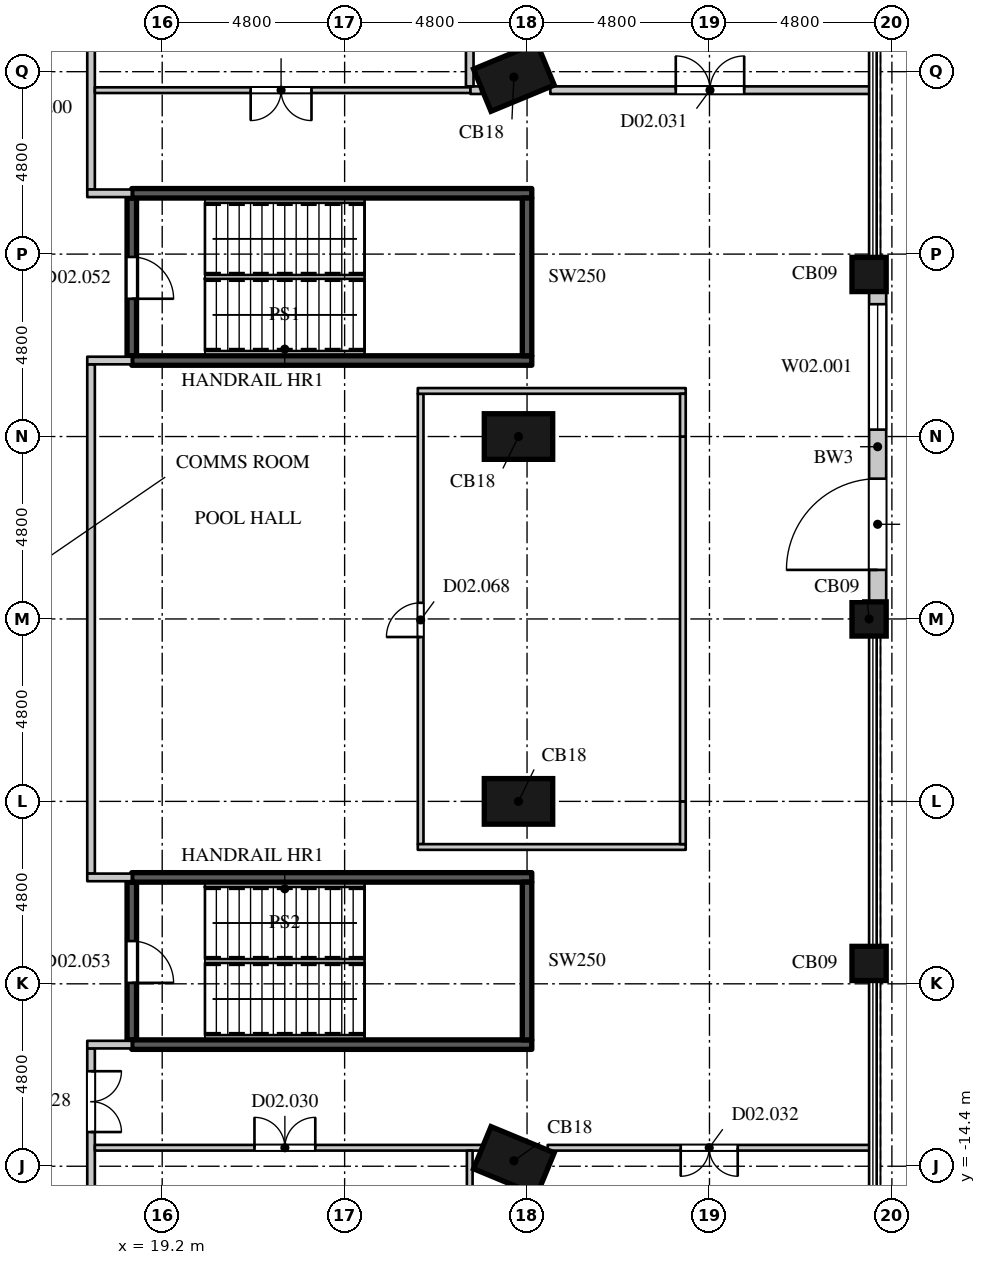
"""IFC4 building model, lengths in metres.
Left out: names, types, materials, properties, quantities, classifications, styles, units other than length and angle.
Written with IfcOpenShell. Run it as: python <this file> out.ifc"""

import sys

from ifc_helpers import new_model, si_unit, direction, frame, frame_2d, origin, origin_2d, place, context, subcontext, project, spatial, rectangle, extrude, element, fill, save


model = new_model("IFC4")
c1 = context("Model", 3, precision=1e-05, world=origin(), true_north=direction((0.0, 1.0)))
c2 = subcontext(c1, "Body", "Model", "MODEL_VIEW")
j1 = project(units=[si_unit("LENGTHUNIT", "METRE"), si_unit("PLANEANGLEUNIT", "RADIAN")], contexts=[c1])
p1 = place(None, origin())
s1 = spatial("IfcSite", under=j1, at=p1, CompositionType="ELEMENT")
p2 = place(p1, origin())
s2 = spatial("IfcBuilding", under=s1, at=p2, CompositionType="ELEMENT")
p3 = place(p2, frame((0.0, 0.0, 11.0)))
s3 = spatial("IfcBuildingStorey", under=s2, at=p3, CompositionType="ELEMENT", Elevation=11.0)
p4 = place(p3, frame((28.454, -14.257, 0.0), z_axis=(0.0, 0.0, 1.0), x_axis=(0.382683496864, 0.923879505795, 0.0)))
e1 = element("IfcColumn", 1, at=p4, inside=s3, PredefinedType="COLUMN", context=c2, shape_type="SweptSolid", body=[
    extrude(rectangle(XDim=1.2, YDim=1.8, at=origin_2d()), origin(), (0.0, 0.0, 1.0), 5.0),
])
p5 = place(p3, frame((37.8, -9.064, 0.0), z_axis=(0.0, 0.0, 1.0), x_axis=(1.0, 0.0, 0.0)))
e2 = element("IfcColumn", 2, at=p5, inside=s3, PredefinedType="COLUMN", context=c2, shape_type="SweptSolid", body=[
    extrude(rectangle(XDim=0.9, YDim=0.9, at=origin_2d()), origin(), (0.0, 0.0, 1.0), 5.0),
])
p6 = place(p3, frame((28.575, -4.8, 0.0), z_axis=(0.0, 0.0, 1.0), x_axis=(0.0, 1.0, 0.0)))
e3 = element("IfcColumn", 3, at=p6, inside=s3, PredefinedType="COLUMN", context=c2, shape_type="SweptSolid", body=[
    extrude(rectangle(XDim=1.2, YDim=1.8, at=origin_2d()), origin(), (0.0, 0.0, 1.0), 5.0),
])
p7 = place(p3, frame((37.8, 0.0, 0.0), z_axis=(0.0, 0.0, 1.0), x_axis=(1.0, 0.0, 0.0)))
e4 = element("IfcColumn", 4, at=p7, inside=s3, PredefinedType="COLUMN", context=c2, shape_type="SweptSolid", body=[
    extrude(rectangle(XDim=0.9, YDim=0.9, at=origin_2d()), origin(), (0.0, 0.0, 1.0), 5.0),
])
p8 = place(p3, frame((28.575, 4.8, 0.0), z_axis=(0.0, 0.0, 1.0), x_axis=(0.0, 1.0, 0.0)))
e5 = element("IfcColumn", 5, at=p8, inside=s3, PredefinedType="COLUMN", context=c2, shape_type="SweptSolid", body=[
    extrude(rectangle(XDim=1.2, YDim=1.8, at=origin_2d()), origin(), (0.0, 0.0, 1.0), 5.0),
])
p9 = place(p3, frame((37.8, 9.064, 0.0), z_axis=(0.0, 0.0, 1.0), x_axis=(1.0, 0.0, 0.0)))
e6 = element("IfcColumn", 6, at=p9, inside=s3, PredefinedType="COLUMN", context=c2, shape_type="SweptSolid", body=[
    extrude(rectangle(XDim=0.9, YDim=0.9, at=origin_2d()), origin(), (0.0, 0.0, 1.0), 5.0),
])
p10 = place(p3, frame((28.454, 14.257, 0.0), z_axis=(0.0, 0.0, 1.0), x_axis=(-0.382683496864, 0.923879505795, 0.0)))
e7 = element("IfcColumn", 7, at=p10, inside=s3, PredefinedType="COLUMN", context=c2, shape_type="SweptSolid", body=[
    extrude(rectangle(XDim=1.2, YDim=1.8, at=origin_2d()), origin(), (0.0, 0.0, 1.0), 5.0),
])
p11 = place(p3, frame((38.025, 0.45, 0.0), z_axis=(0.0, 0.0, 1.0), x_axis=(0.0, 1.0, 0.0)))
e8 = element("IfcWall", 8, at=p11, inside=s3, PredefinedType="ELEMENTEDWALL", context=c2, shape_type="SweptSolid", body=[
    extrude(rectangle(XDim=8.164, YDim=0.45, at=frame_2d((4.082, 0.0))), origin(), (0.0, 0.0, 1.0), 3.8),
])
p12 = place(p11, frame((0.841, 0.0, 0.0)))
e9 = element("IfcOpeningElement", 9, at=p12, cuts=e8, PredefinedType="OPENING", context=c2, shape_type="SweptSolid", body=[
    extrude(rectangle(XDim=2.4, YDim=2.7, at=frame_2d((1.2, 1.35))), frame((0.0, 0.235, 0.0), z_axis=(0.0, -1.0, 0.0), x_axis=(1.0, 0.0, 0.0)), (0.0, 0.0, 1.0), 0.47),
])
p13 = place(p11, frame((4.532, 0.0, 1.05)))
e10 = element("IfcOpeningElement", 10, at=p13, cuts=e8, PredefinedType="OPENING", context=c2, shape_type="SweptSolid", body=[
    extrude(rectangle(XDim=3.3, YDim=2.7, at=frame_2d((1.65, 1.35))), frame((0.0, 0.235, 0.0), z_axis=(0.0, -1.0, 0.0), x_axis=(1.0, 0.0, 0.0)), (0.0, 0.0, 1.0), 0.47),
])
p14 = place(p3, frame((17.328, -15.6, 0.0), z_axis=(0.0, 0.0, 1.0), x_axis=(0.0, 1.0, 0.0)))
e11 = element("IfcWall", 11, at=p14, inside=s3, PredefinedType="PARTITIONING", context=c2, shape_type="SweptSolid", body=[
    extrude(rectangle(XDim=4.3, YDim=0.2, at=frame_2d((2.15, 0.0))), origin(), (0.0, 0.0, 1.0), 4.65),
])
p15 = place(p14, frame((2.1, 0.0, 0.0)))
e12 = element("IfcOpeningElement", 12, at=p15, cuts=e11, PredefinedType="OPENING", context=c2, shape_type="SweptSolid", body=[
    extrude(rectangle(XDim=1.6, YDim=2.4, at=frame_2d((0.8, 1.2))), frame((0.0, 0.11, 0.0), z_axis=(0.0, -1.0, 0.0), x_axis=(1.0, 0.0, 0.0)), (0.0, 0.0, 1.0), 0.22),
])
p16 = place(p3, frame((17.228, -11.2, 0.0), z_axis=(0.0, 0.0, 1.0), x_axis=(1.0, 0.0, 0.0)))
e13 = element("IfcWall", 13, at=p16, inside=s3, PredefinedType="PARTITIONING", context=c2, shape_type="SweptSolid", body=[
    extrude(rectangle(XDim=1.172, YDim=0.2, at=frame_2d((0.586, 0.0))), origin(), (0.0, 0.0, 1.0), 4.65),
])
p17 = place(p3, frame((17.328, -6.7, 0.0), z_axis=(0.0, 0.0, 1.0), x_axis=(0.0, 1.0, 0.0)))
e14 = element("IfcWall", 14, at=p17, inside=s3, PredefinedType="PARTITIONING", context=c2, shape_type="SweptSolid", body=[
    extrude(rectangle(XDim=13.4, YDim=0.2, at=frame_2d((6.7, 0.0))), origin(), (0.0, 0.0, 1.0), 4.65),
])
for number, where, z_axis, x_axis in (
    (15, (17.228, -6.8, 0.0), (0.0, 0.0, 1.0), (1.0, 0.0, 0.0)),
    (16, (17.228, 6.8, 0.0), (0.0, 0.0, 1.0), (1.0, 0.0, 0.0)),
):
    element("IfcWall", number, at=place(p3, frame(where, z_axis=z_axis, x_axis=x_axis)), inside=s3, PredefinedType="PARTITIONING", context=c2, shape_type="SweptSolid", body=[
        extrude(rectangle(XDim=1.172, YDim=0.2, at=frame_2d((0.586, 0.0))), origin(), (0.0, 0.0, 1.0), 4.65),
    ])
p18 = place(p3, frame((17.328, 11.3, 0.0), z_axis=(0.0, 0.0, 1.0), x_axis=(0.0, 1.0, 0.0)))
e17 = element("IfcWall", 17, at=p18, inside=s3, PredefinedType="PARTITIONING", context=c2, shape_type="SweptSolid", body=[
    extrude(rectangle(XDim=4.28, YDim=0.2, at=frame_2d((2.14, 0.0))), origin(), (0.0, 0.0, 1.0), 4.65),
])
p19 = place(p3, frame((17.228, 11.2, 0.0), z_axis=(0.0, 0.0, 1.0), x_axis=(1.0, 0.0, 0.0)))
e18 = element("IfcWall", 18, at=p19, inside=s3, PredefinedType="PARTITIONING", context=c2, shape_type="SweptSolid", body=[
    extrude(rectangle(XDim=1.172, YDim=0.2, at=frame_2d((0.586, 0.0))), origin(), (0.0, 0.0, 1.0), 4.65),
])
p20 = place(p3, frame((17.428, -13.914, 0.0), z_axis=(0.0, 0.0, 1.0), x_axis=(1.0, 0.0, 0.0)))
e19 = element("IfcWall", 19, at=p20, inside=s3, PredefinedType="PARTITIONING", context=c2, shape_type="SweptSolid", body=[
    extrude(rectangle(XDim=10.174, YDim=0.15, at=frame_2d((5.087, 0.0))), origin(), (0.0, 0.0, 1.0), 4.65),
])
p21 = place(p20, frame((4.2, 0.0, 0.0)))
e20 = element("IfcOpeningElement", 20, at=p21, cuts=e19, PredefinedType="OPENING", context=c2, shape_type="SweptSolid", body=[
    extrude(rectangle(XDim=1.6, YDim=2.4, at=frame_2d((0.8, 1.2))), frame((0.0, 0.085, 0.0), z_axis=(0.0, -1.0, 0.0), x_axis=(1.0, 0.0, 0.0)), (0.0, 0.0, 1.0), 0.17),
])
p22 = place(p3, frame((29.343, -13.914, 0.0), z_axis=(0.0, 0.0, 1.0), x_axis=(1.0, 0.0, 0.0)))
e21 = element("IfcWall", 21, at=p22, inside=s3, PredefinedType="PARTITIONING", context=c2, shape_type="SweptSolid", body=[
    extrude(rectangle(XDim=8.512, YDim=0.15, at=frame_2d((4.256, 0.0))), origin(), (0.0, 0.0, 1.0), 4.65),
])
p23 = place(p22, frame((3.5, 0.0, 0.0)))
e22 = element("IfcOpeningElement", 22, at=p23, cuts=e21, PredefinedType="OPENING", context=c2, shape_type="SweptSolid", body=[
    extrude(rectangle(XDim=1.5, YDim=2.2, at=frame_2d((0.75, 1.1))), frame((0.0, 0.085, 0.0), z_axis=(0.0, -1.0, 0.0), x_axis=(1.0, 0.0, 0.0)), (0.0, 0.0, 1.0), 0.17),
])
p24 = place(p3, frame((17.428, 13.914, 0.0), z_axis=(0.0, 0.0, 1.0), x_axis=(1.0, 0.0, 0.0)))
e23 = element("IfcWall", 23, at=p24, inside=s3, PredefinedType="PARTITIONING", context=c2, shape_type="SweptSolid", body=[
    extrude(rectangle(XDim=9.884, YDim=0.15, at=frame_2d((4.942, 0.0))), origin(), (0.0, 0.0, 1.0), 4.65),
])
p25 = place(p24, frame((4.1, 0.0, 0.0)))
e24 = element("IfcOpeningElement", 24, at=p25, cuts=e23, PredefinedType="OPENING", context=c2, shape_type="SweptSolid", body=[
    extrude(rectangle(XDim=1.6, YDim=2.4, at=frame_2d((0.8, 1.2))), frame((0.0, 0.085, 0.0), z_axis=(0.0, -1.0, 0.0), x_axis=(1.0, 0.0, 0.0)), (0.0, 0.0, 1.0), 0.17),
])
p26 = place(p3, frame((26.0, -5.925, 0.0), z_axis=(0.0, 0.0, 1.0), x_axis=(0.0, 1.0, 0.0)))
e25 = element("IfcWall", 25, at=p26, inside=s3, PredefinedType="PARTITIONING", context=c2, shape_type="SweptSolid", body=[
    extrude(rectangle(XDim=11.85, YDim=0.15, at=frame_2d((5.925, 0.0))), origin(), (0.0, 0.0, 1.0), 4.65),
])
p27 = place(p26, frame((5.45, 0.0, 0.0)))
e26 = element("IfcOpeningElement", 26, at=p27, cuts=e25, PredefinedType="OPENING", context=c2, shape_type="SweptSolid", body=[
    extrude(rectangle(XDim=0.9, YDim=2.2, at=frame_2d((0.45, 1.1))), frame((0.0, 0.085, 0.0), z_axis=(0.0, -1.0, 0.0), x_axis=(1.0, 0.0, 0.0)), (0.0, 0.0, 1.0), 0.17),
])
for number, where, z_axis, x_axis in (
    (27, (25.925, -6.0, 0.0), (0.0, 0.0, 1.0), (1.0, 0.0, 0.0)),
    (28, (25.925, 6.0, 0.0), (0.0, 0.0, 1.0), (1.0, 0.0, 0.0)),
):
    element("IfcWall", number, at=place(p3, frame(where, z_axis=z_axis, x_axis=x_axis)), inside=s3, PredefinedType="PARTITIONING", context=c2, shape_type="SweptSolid", body=[
        extrude(rectangle(XDim=7.05, YDim=0.15, at=frame_2d((3.525, 0.0))), origin(), (0.0, 0.0, 1.0), 4.65),
    ])
p28 = place(p3, frame((27.292, -28.714, 0.0), z_axis=(0.0, 0.0, 1.0), x_axis=(0.0, 1.0, 0.0)))
e29 = element("IfcWall", 29, at=p28, inside=s3, PredefinedType="PARTITIONING", context=c2, shape_type="SweptSolid", body=[
    extrude(rectangle(XDim=14.725, YDim=0.15, at=frame_2d((7.363, 0.0))), origin(), (0.0, 0.0, 1.0), 4.65),
])
p29 = place(p3, frame((32.9, -5.925, 0.0), z_axis=(0.0, 0.0, 1.0), x_axis=(0.0, 1.0, 0.0)))
e30 = element("IfcWall", 30, at=p29, inside=s3, PredefinedType="PARTITIONING", context=c2, shape_type="SweptSolid", body=[
    extrude(rectangle(XDim=1.125, YDim=0.15, at=frame_2d((0.562, 0.0))), origin(), (0.0, 0.0, 1.0), 3.4),
])
p30 = place(p3, frame((32.9, -4.8, 0.0), z_axis=(0.0, 0.0, 1.0), x_axis=(0.0, 1.0, 0.0)))
e31 = element("IfcWall", 31, at=p30, inside=s3, PredefinedType="PARTITIONING", context=c2, shape_type="SweptSolid", body=[
    extrude(rectangle(XDim=9.6, YDim=0.15, at=frame_2d((4.8, 0.0))), origin(), (0.0, 0.0, 1.0), 4.65),
])
p31 = place(p3, frame((32.9, 4.8, 0.0), z_axis=(0.0, 0.0, 1.0), x_axis=(0.0, 1.0, 0.0)))
e32 = element("IfcWall", 32, at=p31, inside=s3, PredefinedType="PARTITIONING", context=c2, shape_type="SweptSolid", body=[
    extrude(rectangle(XDim=1.125, YDim=0.15, at=frame_2d((0.562, 0.0))), origin(), (0.0, 0.0, 1.0), 3.4),
])
p32 = place(p3, frame((27.312, 13.914, 0.0), z_axis=(0.0, 0.0, 1.0), x_axis=(1.0, 0.0, 0.0)))
e33 = element("IfcWall", 33, at=p32, inside=s3, PredefinedType="PARTITIONING", context=c2, shape_type="SweptSolid", body=[
    extrude(rectangle(XDim=0.281, YDim=0.2, at=frame_2d((0.14, 0.0))), origin(), (0.0, 0.0, 1.0), 4.65),
])
p33 = place(p3, frame((29.413, 13.914, 0.0), z_axis=(0.0, 0.0, 1.0), x_axis=(1.0, 0.0, 0.0)))
e34 = element("IfcWall", 34, at=p33, inside=s3, PredefinedType="PARTITIONING", context=c2, shape_type="SweptSolid", body=[
    extrude(rectangle(XDim=8.442, YDim=0.2, at=frame_2d((4.221, 0.0))), origin(), (0.0, 0.0, 1.0), 4.65),
])
p34 = place(p33, frame((3.3, 0.0, 0.0)))
e35 = element("IfcOpeningElement", 35, at=p34, cuts=e34, PredefinedType="OPENING", context=c2, shape_type="SweptSolid", body=[
    extrude(rectangle(XDim=1.8, YDim=2.4, at=frame_2d((0.9, 1.2))), frame((0.0, 0.11, 0.0), z_axis=(0.0, -1.0, 0.0), x_axis=(1.0, 0.0, 0.0)), (0.0, 0.0, 1.0), 0.22),
])
p35 = place(p3, frame((27.292, 14.013, 0.0), z_axis=(0.0, 0.0, 1.0), x_axis=(0.0, 1.0, 0.0)))
e36 = element("IfcWall", 36, at=p35, inside=s3, PredefinedType="PARTITIONING", context=c2, shape_type="SweptSolid", body=[
    extrude(rectangle(XDim=14.7, YDim=0.2, at=frame_2d((7.35, 0.0))), origin(), (0.0, 0.0, 1.0), 4.65),
])
p36 = place(p3, frame((18.4, -11.075, 0.0), z_axis=(0.0, 0.0, 1.0), x_axis=(0.0, 1.0, 0.0)))
e37 = element("IfcWall", 37, at=p36, inside=s3, PredefinedType="SHEAR", context=c2, shape_type="SweptSolid", body=[
    extrude(rectangle(XDim=4.15, YDim=0.25, at=frame_2d((2.075, 0.0))), origin(), (0.0, 0.0, 1.0), 4.65),
])
p37 = place(p36, frame((1.5, 0.0, 0.0)))
e38 = element("IfcOpeningElement", 38, at=p37, cuts=e37, PredefinedType="OPENING", context=c2, shape_type="SweptSolid", body=[
    extrude(rectangle(XDim=1.1, YDim=2.2, at=frame_2d((0.55, 1.1))), frame((0.0, 0.135, 0.0), z_axis=(0.0, -1.0, 0.0), x_axis=(1.0, 0.0, 0.0)), (0.0, 0.0, 1.0), 0.27),
])
for number, where, z_axis, x_axis in (
    (39, (18.4, -11.2, 0.0), (0.0, 0.0, 1.0), (1.0, 0.0, 0.0)),
    (40, (18.4, -6.8, 0.0), (0.0, 0.0, 1.0), (1.0, 0.0, 0.0)),
):
    element("IfcWall", number, at=place(p3, frame(where, z_axis=z_axis, x_axis=x_axis)), inside=s3, PredefinedType="SHEAR", context=c2, shape_type="SweptSolid", body=[
        extrude(rectangle(XDim=10.525, YDim=0.25, at=frame_2d((5.263, 0.0))), origin(), (0.0, 0.0, 1.0), 4.65),
    ])
p38 = place(p3, frame((18.4, 6.925, 0.0), z_axis=(0.0, 0.0, 1.0), x_axis=(0.0, 1.0, 0.0)))
e41 = element("IfcWall", 41, at=p38, inside=s3, PredefinedType="SHEAR", context=c2, shape_type="SweptSolid", body=[
    extrude(rectangle(XDim=4.15, YDim=0.25, at=frame_2d((2.075, 0.0))), origin(), (0.0, 0.0, 1.0), 4.65),
])
p39 = place(p38, frame((1.5, 0.0, 0.0)))
e42 = element("IfcOpeningElement", 42, at=p39, cuts=e41, PredefinedType="OPENING", context=c2, shape_type="SweptSolid", body=[
    extrude(rectangle(XDim=1.1, YDim=2.2, at=frame_2d((0.55, 1.1))), frame((0.0, 0.135, 0.0), z_axis=(0.0, -1.0, 0.0), x_axis=(1.0, 0.0, 0.0)), (0.0, 0.0, 1.0), 0.27),
])
for number, where, z_axis, x_axis in (
    (43, (18.4, 6.8, 0.0), (0.0, 0.0, 1.0), (1.0, 0.0, 0.0)),
    (44, (18.4, 11.2, 0.0), (0.0, 0.0, 1.0), (1.0, 0.0, 0.0)),
):
    element("IfcWall", number, at=place(p3, frame(where, z_axis=z_axis, x_axis=x_axis)), inside=s3, PredefinedType="SHEAR", context=c2, shape_type="SweptSolid", body=[
        extrude(rectangle(XDim=10.525, YDim=0.25, at=frame_2d((5.263, 0.0))), origin(), (0.0, 0.0, 1.0), 4.65),
    ])
for number, where, z_axis, x_axis in (
    (45, (28.8, -11.075, 0.0), (0.0, 0.0, 1.0), (0.0, 1.0, 0.0)),
    (46, (28.8, 6.925, 0.0), (0.0, 0.0, 1.0), (0.0, 1.0, 0.0)),
):
    element("IfcWall", number, at=place(p3, frame(where, z_axis=z_axis, x_axis=x_axis)), inside=s3, PredefinedType="SHEAR", context=c2, shape_type="SweptSolid", body=[
        extrude(rectangle(XDim=4.15, YDim=0.25, at=frame_2d((2.075, 0.0))), origin(), (0.0, 0.0, 1.0), 4.65),
    ])
p40 = place(p12, origin())
e47 = element("IfcDoor", 47, at=p40, inside=s3, OperationType="SINGLE_SWING_LEFT", PredefinedType="DOOR", context=c2, shape_type="SweptSolid", body=[
    extrude(rectangle(XDim=2.4, YDim=2.7, at=frame_2d((1.2, 1.35))), frame((0.0, 0.13, 0.0), z_axis=(0.0, -1.0, 0.0), x_axis=(1.0, 0.0, 0.0)), (0.0, 0.0, 1.0), 0.05),
])
fill(e9, e47)
p41 = place(p13, origin())
e48 = element("IfcWindow", 48, at=p41, inside=s3, PartitioningType="SINGLE_PANEL", PredefinedType="WINDOW", context=c2, shape_type="SweptSolid", body=[
    extrude(rectangle(XDim=3.3, YDim=2.7, at=frame_2d((1.65, 1.35))), frame((0.0, 0.135, 0.0), z_axis=(0.0, -1.0, 0.0), x_axis=(1.0, 0.0, 0.0)), (0.0, 0.0, 1.0), 0.06),
])
fill(e10, e48)
p42 = place(p15, origin())
e49 = element("IfcDoor", 49, at=p42, inside=s3, OperationType="DOUBLE_DOOR_SINGLE_SWING", PredefinedType="DOOR", context=c2, shape_type="SweptSolid", body=[
    extrude(rectangle(XDim=1.6, YDim=2.4, at=frame_2d((0.8, 1.2))), frame((0.0, 0.025, 0.0), z_axis=(0.0, -1.0, 0.0), x_axis=(1.0, 0.0, 0.0)), (0.0, 0.0, 1.0), 0.05),
])
fill(e12, e49)
p43 = place(p25, origin())
e50 = element("IfcDoor", 50, at=p43, inside=s3, OperationType="DOUBLE_DOOR_SINGLE_SWING", PredefinedType="DOOR", context=c2, shape_type="SweptSolid", body=[
    extrude(rectangle(XDim=1.6, YDim=2.4, at=frame_2d((0.8, 1.2))), frame((0.0, 0.025, 0.0), z_axis=(0.0, -1.0, 0.0), x_axis=(1.0, 0.0, 0.0)), (0.0, 0.0, 1.0), 0.05),
])
fill(e24, e50)
p44 = place(p21, origin())
e51 = element("IfcDoor", 51, at=p44, inside=s3, OperationType="DOUBLE_DOOR_SINGLE_SWING", PredefinedType="DOOR", context=c2, shape_type="SweptSolid", body=[
    extrude(rectangle(XDim=1.6, YDim=2.4, at=frame_2d((0.8, 1.2))), frame((0.0, 0.025, 0.0), z_axis=(0.0, -1.0, 0.0), x_axis=(1.0, 0.0, 0.0)), (0.0, 0.0, 1.0), 0.05),
])
fill(e20, e51)
p45 = place(p34, origin())
e52 = element("IfcDoor", 52, at=p45, inside=s3, OperationType="DOUBLE_DOOR_SINGLE_SWING", PredefinedType="DOOR", context=c2, shape_type="SweptSolid", body=[
    extrude(rectangle(XDim=1.8, YDim=2.4, at=frame_2d((0.9, 1.2))), frame((0.0, 0.025, 0.0), z_axis=(0.0, -1.0, 0.0), x_axis=(1.0, 0.0, 0.0)), (0.0, 0.0, 1.0), 0.05),
])
fill(e35, e52)
p46 = place(p23, origin())
e53 = element("IfcDoor", 53, at=p46, inside=s3, OperationType="DOUBLE_DOOR_SINGLE_SWING", PredefinedType="DOOR", context=c2, shape_type="SweptSolid", body=[
    extrude(rectangle(XDim=1.5, YDim=2.2, at=frame_2d((0.75, 1.1))), frame((0.0, 0.025, 0.0), z_axis=(0.0, -1.0, 0.0), x_axis=(1.0, 0.0, 0.0)), (0.0, 0.0, 1.0), 0.05),
])
fill(e22, e53)
p47 = place(p39, origin())
e54 = element("IfcDoor", 54, at=p47, inside=s3, OperationType="SINGLE_SWING_RIGHT", PredefinedType="DOOR", context=c2, shape_type="SweptSolid", body=[
    extrude(rectangle(XDim=1.1, YDim=2.2, at=frame_2d((0.55, 1.1))), frame((0.0, 0.025, 0.0), z_axis=(0.0, -1.0, 0.0), x_axis=(1.0, 0.0, 0.0)), (0.0, 0.0, 1.0), 0.05),
])
fill(e42, e54)
p48 = place(p37, origin())
e55 = element("IfcDoor", 55, at=p48, inside=s3, OperationType="SINGLE_SWING_RIGHT", PredefinedType="DOOR", context=c2, shape_type="SweptSolid", body=[
    extrude(rectangle(XDim=1.1, YDim=2.2, at=frame_2d((0.55, 1.1))), frame((0.0, 0.025, 0.0), z_axis=(0.0, -1.0, 0.0), x_axis=(1.0, 0.0, 0.0)), (0.0, 0.0, 1.0), 0.05),
])
fill(e38, e55)
p49 = place(p27, origin())
e56 = element("IfcDoor", 56, at=p49, inside=s3, OperationType="SINGLE_SWING_LEFT", PredefinedType="DOOR", context=c2, shape_type="SweptSolid", body=[
    extrude(rectangle(XDim=0.9, YDim=2.2, at=frame_2d((0.45, 1.1))), frame((0.0, 0.025, 0.0), z_axis=(0.0, -1.0, 0.0), x_axis=(1.0, 0.0, 0.0)), (0.0, 0.0, 1.0), 0.05),
])
fill(e26, e56)
save(model, sys.argv[1])
